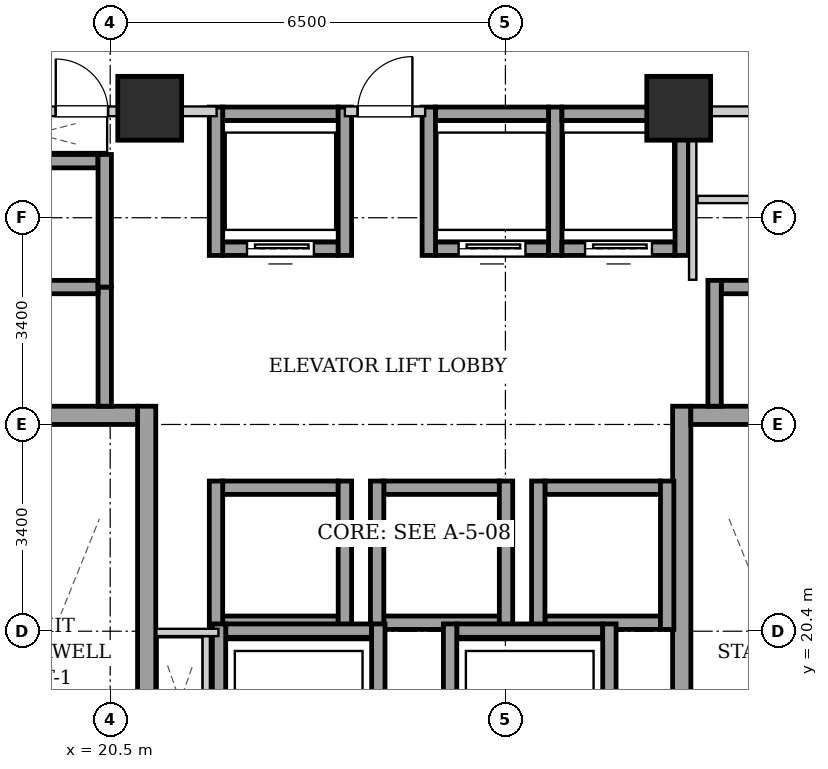
"""IFC4 building model, lengths in metres.
Left out: names, types, materials, properties, quantities, classifications, styles, units other than length and angle.
Written with IfcOpenShell. Run it as: python <this file> out.ifc"""

import sys

from ifc_helpers import new_model, si_unit, direction, frame, frame_2d, origin, origin_2d, place, context, subcontext, project, spatial, rectangle, extrude, element, fill, save


model = new_model("IFC4")
c1 = context("Model", 3, precision=1e-05, world=origin(), true_north=direction((0.0, 1.0)))
c2 = subcontext(c1, "Body", "Model", "MODEL_VIEW")
j1 = project(units=[si_unit("LENGTHUNIT", "METRE"), si_unit("PLANEANGLEUNIT", "RADIAN")], contexts=[c1])
p1 = place(None, origin())
s1 = spatial("IfcSite", under=j1, at=p1, CompositionType="ELEMENT")
p2 = place(p1, origin())
s2 = spatial("IfcBuilding", under=s1, at=p2, CompositionType="ELEMENT")
p3 = place(p2, frame((0.0, 0.0, 116.7)))
s3 = spatial("IfcBuildingStorey", under=s2, at=p3, CompositionType="ELEMENT", Elevation=116.7)
for number, where, z_axis, x_axis in (
    (1, (21.15, 29.0, 0.0), (0.0, 0.0, 1.0), (1.0, 0.0, 0.0)),
    (2, (29.85, 29.0, 0.0), (0.0, 0.0, 1.0), (1.0, 0.0, 0.0)),
):
    element("IfcColumn", number, at=place(p3, frame(where, z_axis=z_axis, x_axis=x_axis)), inside=s3, PredefinedType="COLUMN", context=c2, shape_type="SweptSolid", body=[
        extrude(rectangle(XDim=1.05, YDim=1.05, at=origin_2d()), origin(), (0.0, 0.0, 1.0), 3.2),
    ])
p4 = place(p3, frame((21.1, 15.1, 0.0), z_axis=(0.0, 0.0, 1.0), x_axis=(0.0, 1.0, 0.0)))
e3 = element("IfcWall", 3, at=p4, inside=s3, PredefinedType="SHEAR", context=c2, shape_type="SweptSolid", body=[
    extrude(rectangle(XDim=9.0, YDim=0.3, at=frame_2d((4.5, 0.0))), origin(), (0.0, 0.0, 1.0), 2.88),
])
p5 = place(p3, frame((18.1, 23.95, 0.0), z_axis=(0.0, 0.0, 1.0), x_axis=(1.0, 0.0, 0.0)))
e4 = element("IfcWall", 4, at=p5, inside=s3, PredefinedType="SHEAR", context=c2, shape_type="SweptSolid", body=[
    extrude(rectangle(XDim=2.85, YDim=0.3, at=frame_2d((1.425, 0.0))), origin(), (0.0, 0.0, 1.0), 2.88),
])
p6 = place(p3, frame((29.9, 15.1, 0.0), z_axis=(0.0, 0.0, 1.0), x_axis=(0.0, 1.0, 0.0)))
e5 = element("IfcWall", 5, at=p6, inside=s3, PredefinedType="SHEAR", context=c2, shape_type="SweptSolid", body=[
    extrude(rectangle(XDim=9.0, YDim=0.3, at=frame_2d((4.5, 0.0))), origin(), (0.0, 0.0, 1.0), 2.88),
])
p7 = place(p3, frame((30.05, 23.95, 0.0), z_axis=(0.0, 0.0, 1.0), x_axis=(1.0, 0.0, 0.0)))
e6 = element("IfcWall", 6, at=p7, inside=s3, PredefinedType="SHEAR", context=c2, shape_type="SweptSolid", body=[
    extrude(rectangle(XDim=2.85, YDim=0.3, at=frame_2d((1.425, 0.0))), origin(), (0.0, 0.0, 1.0), 2.88),
])
p8 = place(p3, frame((22.35, 26.69, 0.0), z_axis=(0.0, 0.0, 1.0), x_axis=(1.0, 0.0, 0.0)))
e7 = element("IfcWall", 7, at=p8, inside=s3, PredefinedType="SHEAR", context=c2, shape_type="SweptSolid", body=[
    extrude(rectangle(XDim=1.9, YDim=0.22, at=frame_2d((0.95, 0.0))), origin(), (0.0, 0.0, 1.0), 2.88),
])
p9 = place(p8, frame((0.4, 0.0, 0.0)))
e8 = element("IfcOpeningElement", 8, at=p9, cuts=e7, PredefinedType="OPENING", context=c2, shape_type="SweptSolid", body=[
    extrude(rectangle(XDim=1.1, YDim=2.15, at=frame_2d((0.55, 1.075))), frame((0.0, 0.12, 0.0), z_axis=(0.0, -1.0, 0.0), x_axis=(1.0, 0.0, 0.0)), (0.0, 0.0, 1.0), 0.24),
])
p10 = place(p3, frame((22.35, 28.91, 0.0), z_axis=(0.0, 0.0, 1.0), x_axis=(1.0, 0.0, 0.0)))
e9 = element("IfcWall", 9, at=p10, inside=s3, PredefinedType="SHEAR", context=c2, shape_type="SweptSolid", body=[
    extrude(rectangle(XDim=1.9, YDim=0.22, at=frame_2d((0.95, 0.0))), origin(), (0.0, 0.0, 1.0), 2.88),
])
for number, where, z_axis, x_axis in (
    (10, (22.24, 26.58, 0.0), (0.0, 0.0, 1.0), (0.0, 1.0, 0.0)),
    (11, (24.36, 26.58, 0.0), (0.0, 0.0, 1.0), (0.0, 1.0, 0.0)),
):
    element("IfcWall", number, at=place(p3, frame(where, z_axis=z_axis, x_axis=x_axis)), inside=s3, PredefinedType="SHEAR", context=c2, shape_type="SweptSolid", body=[
        extrude(rectangle(XDim=2.44, YDim=0.22, at=frame_2d((1.22, 0.0))), origin(), (0.0, 0.0, 1.0), 2.88),
    ])
p11 = place(p3, frame((25.85, 26.69, 0.0), z_axis=(0.0, 0.0, 1.0), x_axis=(1.0, 0.0, 0.0)))
e12 = element("IfcWall", 12, at=p11, inside=s3, PredefinedType="SHEAR", context=c2, shape_type="SweptSolid", body=[
    extrude(rectangle(XDim=1.86, YDim=0.22, at=frame_2d((0.93, 0.0))), origin(), (0.0, 0.0, 1.0), 2.88),
])
p12 = place(p11, frame((0.38, 0.0, 0.0)))
e13 = element("IfcOpeningElement", 13, at=p12, cuts=e12, PredefinedType="OPENING", context=c2, shape_type="SweptSolid", body=[
    extrude(rectangle(XDim=1.1, YDim=2.15, at=frame_2d((0.55, 1.075))), frame((0.0, 0.12, 0.0), z_axis=(0.0, -1.0, 0.0), x_axis=(1.0, 0.0, 0.0)), (0.0, 0.0, 1.0), 0.24),
])
p13 = place(p3, frame((25.85, 28.91, 0.0), z_axis=(0.0, 0.0, 1.0), x_axis=(1.0, 0.0, 0.0)))
e14 = element("IfcWall", 14, at=p13, inside=s3, PredefinedType="SHEAR", context=c2, shape_type="SweptSolid", body=[
    extrude(rectangle(XDim=1.86, YDim=0.22, at=frame_2d((0.93, 0.0))), origin(), (0.0, 0.0, 1.0), 2.88),
])
for number, where, z_axis, x_axis in (
    (15, (25.74, 26.58, 0.0), (0.0, 0.0, 1.0), (0.0, 1.0, 0.0)),
    (16, (27.82, 26.58, 0.0), (0.0, 0.0, 1.0), (0.0, 1.0, 0.0)),
):
    element("IfcWall", number, at=place(p3, frame(where, z_axis=z_axis, x_axis=x_axis)), inside=s3, PredefinedType="SHEAR", context=c2, shape_type="SweptSolid", body=[
        extrude(rectangle(XDim=2.44, YDim=0.22, at=frame_2d((1.22, 0.0))), origin(), (0.0, 0.0, 1.0), 2.88),
    ])
p14 = place(p3, frame((27.93, 26.69, 0.0), z_axis=(0.0, 0.0, 1.0), x_axis=(1.0, 0.0, 0.0)))
e17 = element("IfcWall", 17, at=p14, inside=s3, PredefinedType="SHEAR", context=c2, shape_type="SweptSolid", body=[
    extrude(rectangle(XDim=1.86, YDim=0.22, at=frame_2d((0.93, 0.0))), origin(), (0.0, 0.0, 1.0), 2.88),
])
p15 = place(p14, frame((0.38, 0.0, 0.0)))
e18 = element("IfcOpeningElement", 18, at=p15, cuts=e17, PredefinedType="OPENING", context=c2, shape_type="SweptSolid", body=[
    extrude(rectangle(XDim=1.1, YDim=2.15, at=frame_2d((0.55, 1.075))), frame((0.0, 0.12, 0.0), z_axis=(0.0, -1.0, 0.0), x_axis=(1.0, 0.0, 0.0)), (0.0, 0.0, 1.0), 0.24),
])
p16 = place(p3, frame((27.93, 28.91, 0.0), z_axis=(0.0, 0.0, 1.0), x_axis=(1.0, 0.0, 0.0)))
e19 = element("IfcWall", 19, at=p16, inside=s3, PredefinedType="SHEAR", context=c2, shape_type="SweptSolid", body=[
    extrude(rectangle(XDim=1.86, YDim=0.22, at=frame_2d((0.93, 0.0))), origin(), (0.0, 0.0, 1.0), 2.88),
])
p17 = place(p3, frame((29.9, 26.58, 0.0), z_axis=(0.0, 0.0, 1.0), x_axis=(0.0, 1.0, 0.0)))
e20 = element("IfcWall", 20, at=p17, inside=s3, PredefinedType="SHEAR", context=c2, shape_type="SweptSolid", body=[
    extrude(rectangle(XDim=2.44, YDim=0.22, at=frame_2d((1.22, 0.0))), origin(), (0.0, 0.0, 1.0), 2.88),
])
for number, where, z_axis, x_axis in (
    (21, (22.35, 20.54, 0.0), (0.0, 0.0, 1.0), (1.0, 0.0, 0.0)),
    (22, (22.35, 22.76, 0.0), (0.0, 0.0, 1.0), (1.0, 0.0, 0.0)),
):
    element("IfcWall", number, at=place(p3, frame(where, z_axis=z_axis, x_axis=x_axis)), inside=s3, PredefinedType="SHEAR", context=c2, shape_type="SweptSolid", body=[
        extrude(rectangle(XDim=1.9, YDim=0.22, at=frame_2d((0.95, 0.0))), origin(), (0.0, 0.0, 1.0), 2.88),
    ])
for number, where, z_axis, x_axis in (
    (23, (22.24, 20.43, 0.0), (0.0, 0.0, 1.0), (0.0, 1.0, 0.0)),
    (24, (24.36, 20.43, 0.0), (0.0, 0.0, 1.0), (0.0, 1.0, 0.0)),
):
    element("IfcWall", number, at=place(p3, frame(where, z_axis=z_axis, x_axis=x_axis)), inside=s3, PredefinedType="SHEAR", context=c2, shape_type="SweptSolid", body=[
        extrude(rectangle(XDim=2.44, YDim=0.22, at=frame_2d((1.22, 0.0))), origin(), (0.0, 0.0, 1.0), 2.88),
    ])
for number, where, z_axis, x_axis in (
    (25, (25.0, 20.54, 0.0), (0.0, 0.0, 1.0), (1.0, 0.0, 0.0)),
    (26, (25.0, 22.76, 0.0), (0.0, 0.0, 1.0), (1.0, 0.0, 0.0)),
):
    element("IfcWall", number, at=place(p3, frame(where, z_axis=z_axis, x_axis=x_axis)), inside=s3, PredefinedType="SHEAR", context=c2, shape_type="SweptSolid", body=[
        extrude(rectangle(XDim=1.9, YDim=0.22, at=frame_2d((0.95, 0.0))), origin(), (0.0, 0.0, 1.0), 2.88),
    ])
for number, where, z_axis, x_axis in (
    (27, (24.89, 20.43, 0.0), (0.0, 0.0, 1.0), (0.0, 1.0, 0.0)),
    (28, (27.01, 20.43, 0.0), (0.0, 0.0, 1.0), (0.0, 1.0, 0.0)),
):
    element("IfcWall", number, at=place(p3, frame(where, z_axis=z_axis, x_axis=x_axis)), inside=s3, PredefinedType="SHEAR", context=c2, shape_type="SweptSolid", body=[
        extrude(rectangle(XDim=2.44, YDim=0.22, at=frame_2d((1.22, 0.0))), origin(), (0.0, 0.0, 1.0), 2.88),
    ])
for number, where, z_axis, x_axis in (
    (29, (27.65, 20.54, 0.0), (0.0, 0.0, 1.0), (1.0, 0.0, 0.0)),
    (30, (27.65, 22.76, 0.0), (0.0, 0.0, 1.0), (1.0, 0.0, 0.0)),
):
    element("IfcWall", number, at=place(p3, frame(where, z_axis=z_axis, x_axis=x_axis)), inside=s3, PredefinedType="SHEAR", context=c2, shape_type="SweptSolid", body=[
        extrude(rectangle(XDim=1.9, YDim=0.22, at=frame_2d((0.95, 0.0))), origin(), (0.0, 0.0, 1.0), 2.88),
    ])
for number, where, z_axis, x_axis in (
    (31, (27.54, 20.43, 0.0), (0.0, 0.0, 1.0), (0.0, 1.0, 0.0)),
    (32, (29.66, 20.43, 0.0), (0.0, 0.0, 1.0), (0.0, 1.0, 0.0)),
):
    element("IfcWall", number, at=place(p3, frame(where, z_axis=z_axis, x_axis=x_axis)), inside=s3, PredefinedType="SHEAR", context=c2, shape_type="SweptSolid", body=[
        extrude(rectangle(XDim=2.44, YDim=0.22, at=frame_2d((1.22, 0.0))), origin(), (0.0, 0.0, 1.0), 2.88),
    ])
p18 = place(p3, frame((20.41, 24.1, 0.0), z_axis=(0.0, 0.0, 1.0), x_axis=(0.0, 1.0, 0.0)))
e33 = element("IfcWall", 33, at=p18, inside=s3, PredefinedType="SHEAR", context=c2, shape_type="SweptSolid", body=[
    extrude(rectangle(XDim=1.96, YDim=0.22, at=frame_2d((0.98, 0.0))), origin(), (0.0, 0.0, 1.0), 2.88),
])
for number, where, z_axis, x_axis in (
    (34, (18.4, 26.06, 0.0), (0.0, 0.0, 1.0), (1.0, 0.0, 0.0)),
    (35, (18.4, 28.13, 0.0), (0.0, 0.0, 1.0), (1.0, 0.0, 0.0)),
):
    element("IfcWall", number, at=place(p3, frame(where, z_axis=z_axis, x_axis=x_axis)), inside=s3, PredefinedType="SHEAR", context=c2, shape_type="SweptSolid", body=[
        extrude(rectangle(XDim=1.9, YDim=0.22, at=frame_2d((0.95, 0.0))), origin(), (0.0, 0.0, 1.0), 2.88),
    ])
p19 = place(p3, frame((20.41, 26.06, 0.0), z_axis=(0.0, 0.0, 1.0), x_axis=(0.0, 1.0, 0.0)))
e36 = element("IfcWall", 36, at=p19, inside=s3, PredefinedType="SHEAR", context=c2, shape_type="SweptSolid", body=[
    extrude(rectangle(XDim=2.18, YDim=0.22, at=frame_2d((1.09, 0.0))), origin(), (0.0, 0.0, 1.0), 2.88),
])
p20 = place(p3, frame((30.55, 26.06, 0.0), z_axis=(0.0, 0.0, 1.0), x_axis=(1.0, 0.0, 0.0)))
e37 = element("IfcWall", 37, at=p20, inside=s3, PredefinedType="SHEAR", context=c2, shape_type="SweptSolid", body=[
    extrude(rectangle(XDim=1.9, YDim=0.22, at=frame_2d((0.95, 0.0))), origin(), (0.0, 0.0, 1.0), 2.88),
])
p21 = place(p3, frame((30.44, 24.1, 0.0), z_axis=(0.0, 0.0, 1.0), x_axis=(0.0, 1.0, 0.0)))
e38 = element("IfcWall", 38, at=p21, inside=s3, PredefinedType="SHEAR", context=c2, shape_type="SweptSolid", body=[
    extrude(rectangle(XDim=2.07, YDim=0.22, at=frame_2d((1.035, 0.0))), origin(), (0.0, 0.0, 1.0), 2.88),
])
p22 = place(p3, frame((22.4, 20.41, 0.0), z_axis=(0.0, 0.0, 1.0), x_axis=(1.0, 0.0, 0.0)))
e39 = element("IfcWall", 39, at=p22, inside=s3, PredefinedType="SHEAR", context=c2, shape_type="SweptSolid", body=[
    extrude(rectangle(XDim=2.4, YDim=0.22, at=frame_2d((1.2, 0.0))), origin(), (0.0, 0.0, 1.0), 2.88),
])
for number, where, z_axis, x_axis in (
    (40, (22.29, 17.98, 0.0), (0.0, 0.0, 1.0), (0.0, 1.0, 0.0)),
    (41, (24.91, 17.98, 0.0), (0.0, 0.0, 1.0), (0.0, 1.0, 0.0)),
):
    element("IfcWall", number, at=place(p3, frame(where, z_axis=z_axis, x_axis=x_axis)), inside=s3, PredefinedType="SHEAR", context=c2, shape_type="SweptSolid", body=[
        extrude(rectangle(XDim=2.54, YDim=0.22, at=frame_2d((1.27, 0.0))), origin(), (0.0, 0.0, 1.0), 2.88),
    ])
p23 = place(p3, frame((26.2, 20.41, 0.0), z_axis=(0.0, 0.0, 1.0), x_axis=(1.0, 0.0, 0.0)))
e42 = element("IfcWall", 42, at=p23, inside=s3, PredefinedType="SHEAR", context=c2, shape_type="SweptSolid", body=[
    extrude(rectangle(XDim=2.4, YDim=0.22, at=frame_2d((1.2, 0.0))), origin(), (0.0, 0.0, 1.0), 2.88),
])
for number, where, z_axis, x_axis in (
    (43, (26.09, 17.98, 0.0), (0.0, 0.0, 1.0), (0.0, 1.0, 0.0)),
    (44, (28.71, 17.98, 0.0), (0.0, 0.0, 1.0), (0.0, 1.0, 0.0)),
):
    element("IfcWall", number, at=place(p3, frame(where, z_axis=z_axis, x_axis=x_axis)), inside=s3, PredefinedType="SHEAR", context=c2, shape_type="SweptSolid", body=[
        extrude(rectangle(XDim=2.54, YDim=0.22, at=frame_2d((1.27, 0.0))), origin(), (0.0, 0.0, 1.0), 2.88),
    ])
p24 = place(p3, frame((24.36, 28.95, 0.0), z_axis=(0.0, 0.0, 1.0), x_axis=(1.0, 0.0, 0.0)))
e45 = element("IfcWall", 45, at=p24, inside=s3, PredefinedType="PARTITIONING", context=c2, shape_type="SweptSolid", body=[
    extrude(rectangle(XDim=1.32, YDim=0.16, at=frame_2d((0.66, 0.0))), origin(), (0.0, 0.0, 1.0), 2.253),
])
p25 = place(p24, frame((0.21, 0.0, 0.0)))
e46 = element("IfcOpeningElement", 46, at=p25, cuts=e45, PredefinedType="OPENING", context=c2, shape_type="SweptSolid", body=[
    extrude(rectangle(XDim=0.9, YDim=2.05, at=frame_2d((0.45, 1.025))), frame((0.0, 0.09, 0.0), z_axis=(0.0, -1.0, 0.0), x_axis=(1.0, 0.0, 0.0)), (0.0, 0.0, 1.0), 0.18),
])
p26 = place(p3, frame((17.96, 28.95, 0.0), z_axis=(0.0, 0.0, 1.0), x_axis=(1.0, 0.0, 0.0)))
e47 = element("IfcWall", 47, at=p26, inside=s3, PredefinedType="PARTITIONING", context=c2, shape_type="SweptSolid", body=[
    extrude(rectangle(XDim=4.29, YDim=0.16, at=frame_2d((2.145, 0.0))), origin(), (0.0, 0.0, 1.0), 2.253),
])
p27 = place(p26, frame((1.645, 0.0, 0.0)))
e48 = element("IfcOpeningElement", 48, at=p27, cuts=e47, PredefinedType="OPENING", context=c2, shape_type="SweptSolid", body=[
    extrude(rectangle(XDim=0.86, YDim=2.05, at=frame_2d((0.43, 1.025))), frame((0.0, 0.09, 0.0), z_axis=(0.0, -1.0, 0.0), x_axis=(1.0, 0.0, 0.0)), (0.0, 0.0, 1.0), 0.18),
])
p28 = place(p3, frame((22.08, 18.2, 0.0), z_axis=(0.0, 0.0, 1.0), x_axis=(0.0, 1.0, 0.0)))
e49 = element("IfcWall", 49, at=p28, inside=s3, PredefinedType="PARTITIONING", context=c2, shape_type="SweptSolid", body=[
    extrude(rectangle(XDim=2.12, YDim=0.12, at=frame_2d((1.06, 0.0))), origin(), (0.0, 0.0, 1.0), 2.88),
])
p29 = place(p3, frame((22.28, 20.38, 0.0), z_axis=(0.0, 0.0, 1.0), x_axis=(-1.0, 0.0, 0.0)))
e50 = element("IfcWall", 50, at=p29, inside=s3, PredefinedType="PARTITIONING", context=c2, shape_type="SweptSolid", body=[
    extrude(rectangle(XDim=1.02, YDim=0.12, at=frame_2d((0.51, 0.0))), origin(), (0.0, 0.0, 1.0), 2.88),
])
p30 = place(p3, frame((30.08, 26.18, 0.0), z_axis=(0.0, 0.0, 1.0), x_axis=(0.0, 1.0, 0.0)))
e51 = element("IfcWall", 51, at=p30, inside=s3, PredefinedType="PARTITIONING", context=c2, shape_type="SweptSolid", body=[
    extrude(rectangle(XDim=2.68, YDim=0.12, at=frame_2d((1.34, 0.0))), origin(), (0.0, 0.0, 1.0), 2.88),
])
p31 = place(p3, frame((30.16, 27.5, 0.0), z_axis=(0.0, 0.0, 1.0), x_axis=(1.0, 0.0, 0.0)))
e52 = element("IfcWall", 52, at=p31, inside=s3, PredefinedType="PARTITIONING", context=c2, shape_type="SweptSolid", body=[
    extrude(rectangle(XDim=2.88, YDim=0.12, at=frame_2d((1.44, 0.0))), origin(), (0.0, 0.0, 1.0), 2.88),
])
p32 = place(p31, frame((0.97, 0.0, 0.0)))
e53 = element("IfcOpeningElement", 53, at=p32, cuts=e52, PredefinedType="OPENING", context=c2, shape_type="SweptSolid", body=[
    extrude(rectangle(XDim=0.86, YDim=2.05, at=frame_2d((0.43, 1.025))), frame((0.0, 0.07, 0.0), z_axis=(0.0, -1.0, 0.0), x_axis=(1.0, 0.0, 0.0)), (0.0, 0.0, 1.0), 0.14),
])
p33 = place(p3, frame((30.08, 28.95, 0.0), z_axis=(0.0, 0.0, 1.0), x_axis=(1.0, 0.0, 0.0)))
e54 = element("IfcWall", 54, at=p33, inside=s3, PredefinedType="PARTITIONING", context=c2, shape_type="SweptSolid", body=[
    extrude(rectangle(XDim=2.96, YDim=0.16, at=frame_2d((1.48, 0.0))), origin(), (0.0, 0.0, 1.0), 2.88),
])
p34 = place(p33, frame((1.045, 0.0, 0.0)))
e55 = element("IfcOpeningElement", 55, at=p34, cuts=e54, PredefinedType="OPENING", context=c2, shape_type="SweptSolid", body=[
    extrude(rectangle(XDim=0.86, YDim=2.05, at=frame_2d((0.43, 1.025))), frame((0.0, 0.09, 0.0), z_axis=(0.0, -1.0, 0.0), x_axis=(1.0, 0.0, 0.0)), (0.0, 0.0, 1.0), 0.18),
])
p35 = place(p9, origin())
e56 = element("IfcDoor", 56, at=p35, inside=s3, OperationType="SLIDING_TO_LEFT", PredefinedType="DOOR", context=c2, shape_type="SweptSolid", body=[
    extrude(rectangle(XDim=1.1, YDim=2.15, at=frame_2d((0.55, 1.075))), frame((0.0, 0.025, 0.0), z_axis=(0.0, -1.0, 0.0), x_axis=(1.0, 0.0, 0.0)), (0.0, 0.0, 1.0), 0.05),
])
fill(e8, e56)
p36 = place(p12, origin())
e57 = element("IfcDoor", 57, at=p36, inside=s3, OperationType="SLIDING_TO_LEFT", PredefinedType="DOOR", context=c2, shape_type="SweptSolid", body=[
    extrude(rectangle(XDim=1.1, YDim=2.15, at=frame_2d((0.55, 1.075))), frame((0.0, 0.025, 0.0), z_axis=(0.0, -1.0, 0.0), x_axis=(1.0, 0.0, 0.0)), (0.0, 0.0, 1.0), 0.05),
])
fill(e13, e57)
p37 = place(p15, origin())
e58 = element("IfcDoor", 58, at=p37, inside=s3, OperationType="SLIDING_TO_LEFT", PredefinedType="DOOR", context=c2, shape_type="SweptSolid", body=[
    extrude(rectangle(XDim=1.1, YDim=2.15, at=frame_2d((0.55, 1.075))), frame((0.0, 0.025, 0.0), z_axis=(0.0, -1.0, 0.0), x_axis=(1.0, 0.0, 0.0)), (0.0, 0.0, 1.0), 0.05),
])
fill(e18, e58)
p38 = place(p25, origin())
e59 = element("IfcDoor", 59, at=p38, inside=s3, OperationType="SINGLE_SWING_RIGHT", PredefinedType="DOOR", context=c2, shape_type="SweptSolid", body=[
    extrude(rectangle(XDim=0.9, YDim=2.05, at=frame_2d((0.45, 1.025))), frame((0.0, 0.025, 0.0), z_axis=(0.0, -1.0, 0.0), x_axis=(1.0, 0.0, 0.0)), (0.0, 0.0, 1.0), 0.05),
])
fill(e46, e59)
p39 = place(p27, origin())
e60 = element("IfcDoor", 60, at=p39, inside=s3, OperationType="SINGLE_SWING_LEFT", PredefinedType="DOOR", context=c2, shape_type="SweptSolid", body=[
    extrude(rectangle(XDim=0.86, YDim=2.05, at=frame_2d((0.43, 1.025))), frame((0.0, 0.025, 0.0), z_axis=(0.0, -1.0, 0.0), x_axis=(1.0, 0.0, 0.0)), (0.0, 0.0, 1.0), 0.05),
])
fill(e48, e60)
save(model, sys.argv[1])
